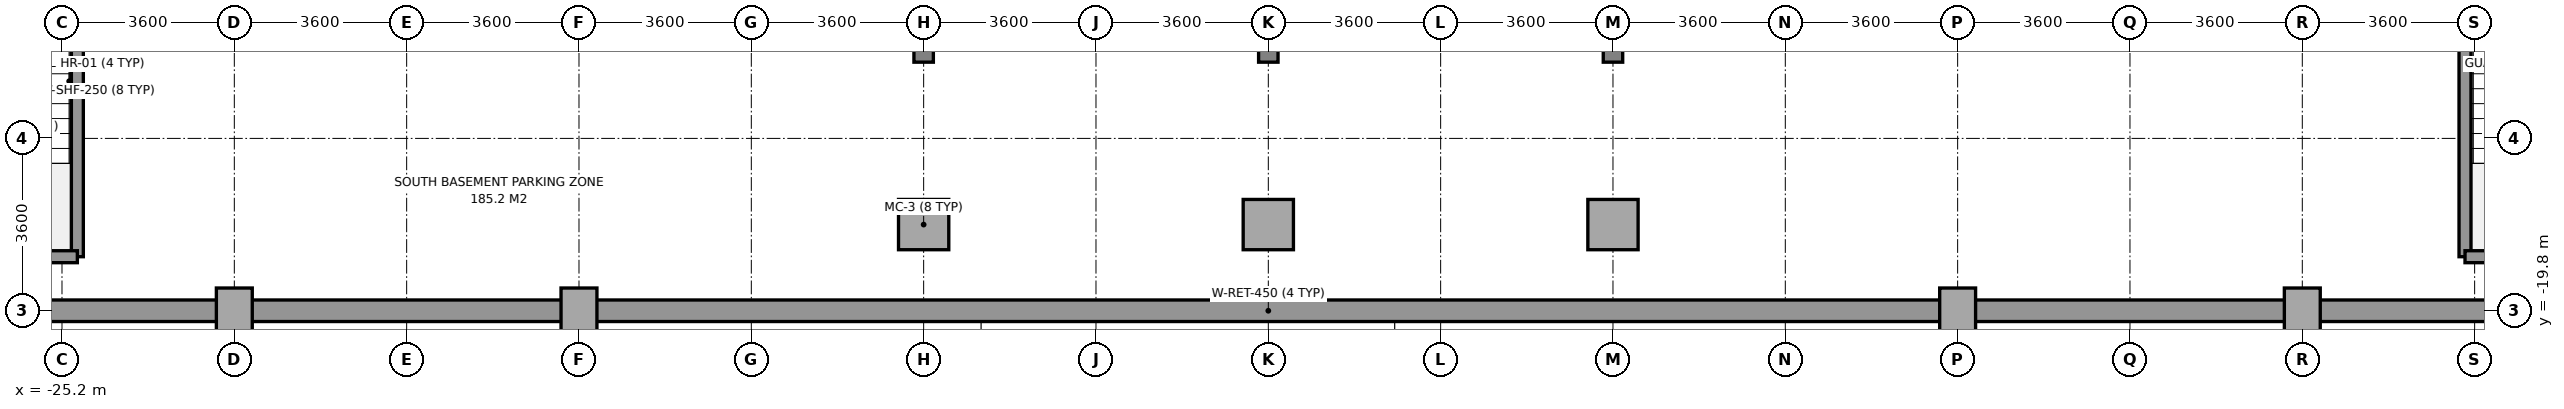
"""IFC4 building model, lengths in metres.
Left out: names, types, materials, properties, quantities, classifications, styles, units other than length and angle.
Written with IfcOpenShell. Run it as: python <this file> out.ifc"""

import sys

from ifc_helpers import new_model, si_unit, direction, frame, frame_2d, origin, origin_2d, place, context, subcontext, project, spatial, rectangle, i_section, extrude, source, transform, mapped, element, save


model = new_model("IFC4")
c1 = context("Model", 3, precision=1e-05, world=origin(), true_north=direction((0.0, 1.0)))
c2 = subcontext(c1, "Body", "Model", "MODEL_VIEW")
j1 = project(units=[si_unit("LENGTHUNIT", "METRE"), si_unit("PLANEANGLEUNIT", "RADIAN")], contexts=[c1])
p1 = place(None, origin())
s1 = spatial("IfcSite", under=j1, at=p1, CompositionType="ELEMENT")
p2 = place(p1, origin())
s2 = spatial("IfcBuilding", under=s1, at=p2, CompositionType="ELEMENT")
p3 = place(p2, frame((0.0, 0.0, -4.2)))
s3 = spatial("IfcBuildingStorey", under=s2, at=p3, CompositionType="ELEMENT", Elevation=-4.2)
m1 = source(origin(), c2, "Body", "SweptSolid", [
    extrude(rectangle(XDim=0.75, YDim=0.95, at=origin_2d()), origin(), (0.0, 0.0, 1.0), 3.95),
])
for number, where, z_axis, x_axis in (
    (1, (-21.6, -19.8, 0.0), (0.0, 0.0, 1.0), (1.0, 0.0, 0.0)),
    (2, (-14.4, -19.8, 0.0), (0.0, 0.0, 1.0), (1.0, 0.0, 0.0)),
):
    element("IfcColumn", number, at=place(p3, frame(where, z_axis=z_axis, x_axis=x_axis)), inside=s3, PredefinedType="COLUMN", context=c2, shape_type="MappedRepresentation", body=[
        mapped(m1, transform((0.0, 0.0, 0.0), x_axis=(1.0, 0.0, 0.0), y_axis=(0.0, 1.0, 0.0), z_axis=(0.0, 0.0, 1.0), scale=1.0)),
    ])
m2 = source(origin(), c2, "Body", "SweptSolid", [
    extrude(rectangle(XDim=1.05, YDim=1.05, at=origin_2d()), origin(), (0.0, 0.0, 1.0), 3.95),
])
p4 = place(p3, frame((-7.2, -18.0, 0.0), z_axis=(0.0, 0.0, 1.0), x_axis=(1.0, 0.0, 0.0)))
e3 = element("IfcColumn", 3, at=p4, inside=s3, PredefinedType="COLUMN", context=c2, shape_type="MappedRepresentation", body=[
    mapped(m2, transform((0.0, 0.0, 0.0), x_axis=(1.0, 0.0, 0.0), y_axis=(0.0, 1.0, 0.0), z_axis=(0.0, 0.0, 1.0), scale=1.0)),
])
m3 = source(origin(), c2, "Body", "SweptSolid", [
    extrude(i_section(OverallWidth=0.406, OverallDepth=0.416, WebThickness=0.024, FlangeThickness=0.039, at=origin_2d()), origin(), (0.0, 0.0, 1.0), 3.95),
])
p5 = place(p3, frame((-7.2, -14.4, 0.0), z_axis=(0.0, 0.0, 1.0), x_axis=(1.0, 0.0, 0.0)))
e4 = element("IfcColumn", 4, at=p5, inside=s3, PredefinedType="COLUMN", context=c2, shape_type="MappedRepresentation", body=[
    mapped(m3, transform((0.0, 0.0, 0.0), x_axis=(1.0, 0.0, 0.0), y_axis=(0.0, 1.0, 0.0), z_axis=(0.0, 0.0, 1.0), scale=1.0)),
])
p6 = place(p3, frame((0.0, -18.0, 0.0), z_axis=(0.0, 0.0, 1.0), x_axis=(1.0, 0.0, 0.0)))
e5 = element("IfcColumn", 5, at=p6, inside=s3, PredefinedType="COLUMN", context=c2, shape_type="MappedRepresentation", body=[
    mapped(m2, transform((0.0, 0.0, 0.0), x_axis=(1.0, 0.0, 0.0), y_axis=(0.0, 1.0, 0.0), z_axis=(0.0, 0.0, 1.0), scale=1.0)),
])
p7 = place(p3, frame((0.0, -14.4, 0.0), z_axis=(0.0, 0.0, 1.0), x_axis=(1.0, 0.0, 0.0)))
e6 = element("IfcColumn", 6, at=p7, inside=s3, PredefinedType="COLUMN", context=c2, shape_type="MappedRepresentation", body=[
    mapped(m3, transform((0.0, 0.0, 0.0), x_axis=(1.0, 0.0, 0.0), y_axis=(0.0, 1.0, 0.0), z_axis=(0.0, 0.0, 1.0), scale=1.0)),
])
p8 = place(p3, frame((7.2, -18.0, 0.0), z_axis=(0.0, 0.0, 1.0), x_axis=(1.0, 0.0, 0.0)))
e7 = element("IfcColumn", 7, at=p8, inside=s3, PredefinedType="COLUMN", context=c2, shape_type="MappedRepresentation", body=[
    mapped(m2, transform((0.0, 0.0, 0.0), x_axis=(1.0, 0.0, 0.0), y_axis=(0.0, 1.0, 0.0), z_axis=(0.0, 0.0, 1.0), scale=1.0)),
])
p9 = place(p3, frame((7.2, -14.4, 0.0), z_axis=(0.0, 0.0, 1.0), x_axis=(1.0, 0.0, 0.0)))
e8 = element("IfcColumn", 8, at=p9, inside=s3, PredefinedType="COLUMN", context=c2, shape_type="MappedRepresentation", body=[
    mapped(m3, transform((0.0, 0.0, 0.0), x_axis=(1.0, 0.0, 0.0), y_axis=(0.0, 1.0, 0.0), z_axis=(0.0, 0.0, 1.0), scale=1.0)),
])
for number, where, z_axis, x_axis in (
    (9, (14.4, -19.8, 0.0), (0.0, 0.0, 1.0), (1.0, 0.0, 0.0)),
    (10, (21.6, -19.8, 0.0), (0.0, 0.0, 1.0), (1.0, 0.0, 0.0)),
):
    element("IfcColumn", number, at=place(p3, frame(where, z_axis=z_axis, x_axis=x_axis)), inside=s3, PredefinedType="COLUMN", context=c2, shape_type="MappedRepresentation", body=[
        mapped(m1, transform((0.0, 0.0, 0.0), x_axis=(1.0, 0.0, 0.0), y_axis=(0.0, 1.0, 0.0), z_axis=(0.0, 0.0, 1.0), scale=1.0)),
    ])
p10 = place(p3, frame((-32.4, -19.8, 0.0), z_axis=(0.0, 0.0, 1.0), x_axis=(1.0, 0.0, 0.0)))
e11 = element("IfcWall", 11, at=p10, inside=s3, PredefinedType="USERDEFINED", context=c2, shape_type="SweptSolid", body=[
    extrude(rectangle(XDim=64.8, YDim=0.45, at=frame_2d((32.4, 0.0))), origin(), (0.0, 0.0, 1.0), 3.95),
])
p11 = place(p3, frame((-24.879, -18.671, 0.0), z_axis=(0.0, 0.0, 1.0), x_axis=(0.0, 1.0, 0.0)))
e12 = element("IfcWall", 12, at=p11, inside=s3, PredefinedType="SOLIDWALL", context=c2, shape_type="SweptSolid", body=[
    extrude(rectangle(XDim=6.922, YDim=0.25, at=frame_2d((3.461, 0.0))), origin(), (0.0, 0.0, 1.0), 3.95),
])
p12 = place(p3, frame((-28.001, -18.671, 0.0), z_axis=(0.0, 0.0, 1.0), x_axis=(1.0, 0.0, 0.0)))
e13 = element("IfcWall", 13, at=p12, inside=s3, PredefinedType="SOLIDWALL", context=c2, shape_type="SweptSolid", body=[
    extrude(rectangle(XDim=3.122, YDim=0.25, at=frame_2d((1.561, 0.0))), origin(), (0.0, 0.0, 1.0), 3.95),
])
p13 = place(p3, frame((24.999, -18.671, 0.0), z_axis=(0.0, 0.0, 1.0), x_axis=(0.0, 1.0, 0.0)))
e14 = element("IfcWall", 14, at=p13, inside=s3, PredefinedType="SOLIDWALL", context=c2, shape_type="SweptSolid", body=[
    extrude(rectangle(XDim=6.922, YDim=0.25, at=frame_2d((3.461, 0.0))), origin(), (0.0, 0.0, 1.0), 3.95),
])
p14 = place(p3, frame((24.999, -18.671, 0.0), z_axis=(0.0, 0.0, 1.0), x_axis=(1.0, 0.0, 0.0)))
e15 = element("IfcWall", 15, at=p14, inside=s3, PredefinedType="SOLIDWALL", context=c2, shape_type="SweptSolid", body=[
    extrude(rectangle(XDim=3.122, YDim=0.25, at=frame_2d((1.561, 0.0))), origin(), (0.0, 0.0, 1.0), 3.95),
])
save(model, sys.argv[1])
